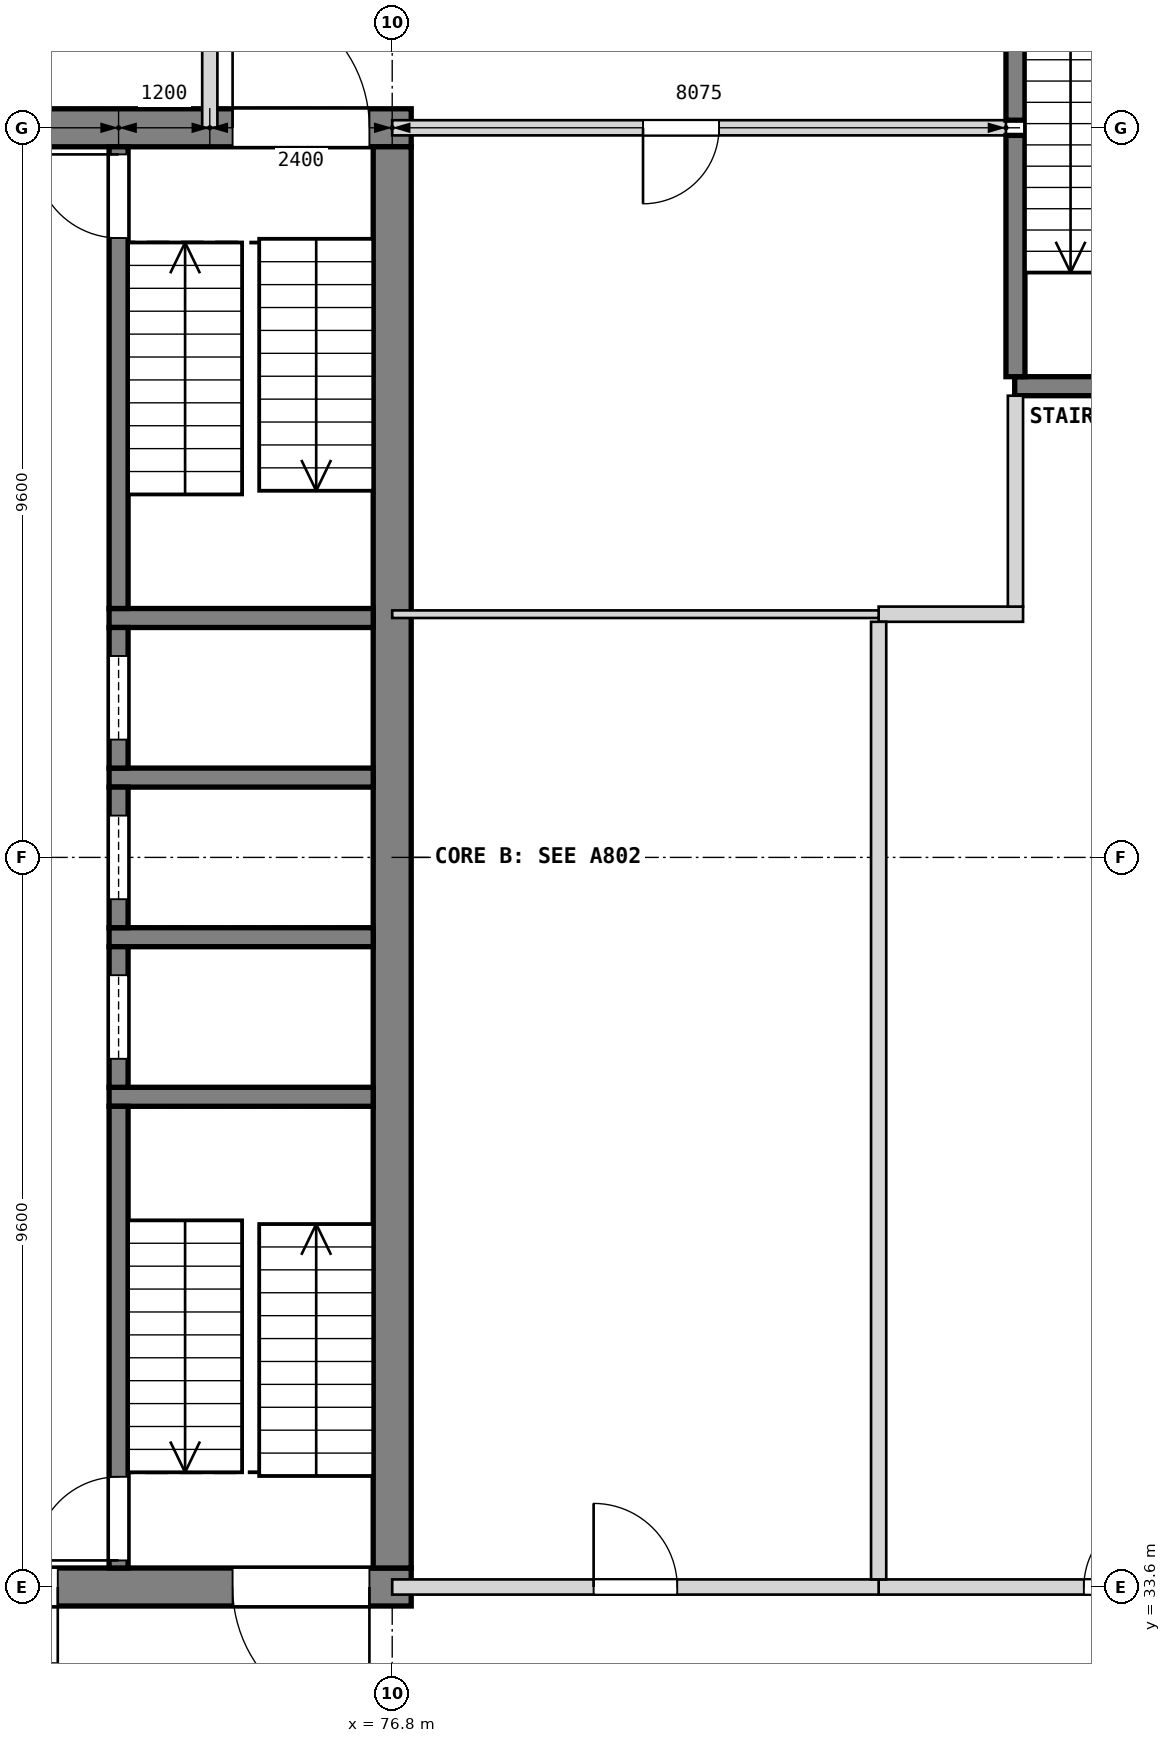
"""IFC4 building model, lengths in metres.
Left out: names, types, materials, properties, quantities, classifications, styles, units other than length and angle.
Written with IfcOpenShell. Run it as: python <this file> out.ifc"""

import sys

from ifc_helpers import new_model, si_unit, direction, frame, frame_2d, origin, place, context, subcontext, project, spatial, rectangle, extrude, element, fill, save


model = new_model("IFC4")
c1 = context("Model", 3, precision=1e-05, world=origin(), true_north=direction((0.0, 1.0)))
c2 = subcontext(c1, "Body", "Model", "MODEL_VIEW")
j1 = project(units=[si_unit("LENGTHUNIT", "METRE"), si_unit("PLANEANGLEUNIT", "RADIAN")], contexts=[c1])
p1 = place(None, origin())
s1 = spatial("IfcSite", under=j1, at=p1, CompositionType="ELEMENT")
p2 = place(p1, origin())
s2 = spatial("IfcBuilding", under=s1, at=p2, CompositionType="ELEMENT")
p3 = place(p2, origin())
s3 = spatial("IfcBuildingStorey", under=s2, at=p3, CompositionType="ELEMENT", Elevation=0.0)
p4 = place(p3, frame((63.75, 52.8, 0.0), z_axis=(0.0, 0.0, 1.0), x_axis=(1.0, 0.0, 0.0)))
e1 = element("IfcWall", 1, at=p4, inside=s3, PredefinedType="SHEAR", context=c2, shape_type="SweptSolid", body=[
    extrude(rectangle(XDim=13.3, YDim=0.5, at=frame_2d((6.65, 0.0))), origin(), (0.0, 0.0, 1.0), 4.2),
])
p5 = place(p4, frame((10.95, 0.0, 0.0)))
e2 = element("IfcOpeningElement", 2, at=p5, cuts=e1, PredefinedType="OPENING", context=c2, shape_type="SweptSolid", body=[
    extrude(rectangle(XDim=1.8, YDim=2.1, at=frame_2d((0.9, 1.05))), frame((0.0, 0.26, 0.0), z_axis=(0.0, -1.0, 0.0), x_axis=(1.0, 0.0, 0.0)), (0.0, 0.0, 1.0), 0.52),
])
p6 = place(p3, frame((63.75, 33.6, 0.0), z_axis=(0.0, 0.0, 1.0), x_axis=(1.0, 0.0, 0.0)))
e3 = element("IfcWall", 3, at=p6, inside=s3, PredefinedType="SHEAR", context=c2, shape_type="SweptSolid", body=[
    extrude(rectangle(XDim=13.3, YDim=0.5, at=frame_2d((6.65, 0.0))), origin(), (0.0, 0.0, 1.0), 4.2),
])
p7 = place(p6, frame((6.65, 0.0, 0.0)))
e4 = element("IfcOpeningElement", 4, at=p7, cuts=e3, PredefinedType="OPENING", context=c2, shape_type="SweptSolid", body=[
    extrude(rectangle(XDim=2.0, YDim=2.1, at=frame_2d((1.0, 1.05))), frame((0.0, 0.26, 0.0), z_axis=(0.0, -1.0, 0.0), x_axis=(1.0, 0.0, 0.0)), (0.0, 0.0, 1.0), 0.52),
])
p8 = place(p6, frame((10.95, 0.0, 0.0)))
e5 = element("IfcOpeningElement", 5, at=p8, cuts=e3, PredefinedType="OPENING", context=c2, shape_type="SweptSolid", body=[
    extrude(rectangle(XDim=1.8, YDim=2.1, at=frame_2d((0.9, 1.05))), frame((0.0, 0.26, 0.0), z_axis=(0.0, -1.0, 0.0), x_axis=(1.0, 0.0, 0.0)), (0.0, 0.0, 1.0), 0.52),
])
p9 = place(p3, frame((76.8, 33.85, 0.0), z_axis=(0.0, 0.0, 1.0), x_axis=(0.0, 1.0, 0.0)))
e6 = element("IfcWall", 6, at=p9, inside=s3, PredefinedType="SHEAR", context=c2, shape_type="SweptSolid", body=[
    extrude(rectangle(XDim=18.7, YDim=0.5, at=frame_2d((9.35, 0.0))), origin(), (0.0, 0.0, 1.0), 4.2),
])
for number, where, z_axis, x_axis in (
    (7, (76.55, 40.05, 0.0), (0.0, 0.0, 1.0), (-1.0, 0.0, 0.0)),
    (8, (76.55, 42.15, 0.0), (0.0, 0.0, 1.0), (-1.0, 0.0, 0.0)),
    (9, (76.55, 44.25, 0.0), (0.0, 0.0, 1.0), (-1.0, 0.0, 0.0)),
    (10, (76.55, 46.35, 0.0), (0.0, 0.0, 1.0), (-1.0, 0.0, 0.0)),
):
    element("IfcWall", number, at=place(p3, frame(where, z_axis=z_axis, x_axis=x_axis)), inside=s3, PredefinedType="SOLIDWALL", context=c2, shape_type="SweptSolid", body=[
        extrude(rectangle(XDim=3.475, YDim=0.25, at=frame_2d((1.738, 0.0))), origin(), (0.0, 0.0, 1.0), 3.9),
    ])
p10 = place(p3, frame((73.2, 33.85, 0.0), z_axis=(0.0, 0.0, 1.0), x_axis=(0.0, 1.0, 0.0)))
e11 = element("IfcWall", 11, at=p10, inside=s3, PredefinedType="SOLIDWALL", context=c2, shape_type="SweptSolid", body=[
    extrude(rectangle(XDim=6.075, YDim=0.25, at=frame_2d((3.038, 0.0))), origin(), (0.0, 0.0, 1.0), 3.9),
])
p11 = place(p10, frame((0.1, 0.0, 0.0)))
e12 = element("IfcOpeningElement", 12, at=p11, cuts=e11, PredefinedType="OPENING", context=c2, shape_type="SweptSolid", body=[
    extrude(rectangle(XDim=1.1, YDim=2.1, at=frame_2d((0.55, 1.05))), frame((0.0, 0.135, 0.0), z_axis=(0.0, -1.0, 0.0), x_axis=(1.0, 0.0, 0.0)), (0.0, 0.0, 1.0), 0.27),
])
p12 = place(p3, frame((73.2, 40.175, 0.0), z_axis=(0.0, 0.0, 1.0), x_axis=(0.0, 1.0, 0.0)))
e13 = element("IfcWall", 13, at=p12, inside=s3, PredefinedType="SOLIDWALL", context=c2, shape_type="SweptSolid", body=[
    extrude(rectangle(XDim=1.85, YDim=0.25, at=frame_2d((0.925, 0.0))), origin(), (0.0, 0.0, 1.0), 3.9),
])
p13 = place(p12, frame((0.375, 0.0, 0.0)))
e14 = element("IfcOpeningElement", 14, at=p13, cuts=e13, PredefinedType="OPENING", context=c2, shape_type="SweptSolid", body=[
    extrude(rectangle(XDim=1.1, YDim=2.1, at=frame_2d((0.55, 1.05))), frame((0.0, 0.135, 0.0), z_axis=(0.0, -1.0, 0.0), x_axis=(1.0, 0.0, 0.0)), (0.0, 0.0, 1.0), 0.27),
])
p14 = place(p3, frame((73.2, 42.275, 0.0), z_axis=(0.0, 0.0, 1.0), x_axis=(0.0, 1.0, 0.0)))
e15 = element("IfcWall", 15, at=p14, inside=s3, PredefinedType="SOLIDWALL", context=c2, shape_type="SweptSolid", body=[
    extrude(rectangle(XDim=1.85, YDim=0.25, at=frame_2d((0.925, 0.0))), origin(), (0.0, 0.0, 1.0), 3.9),
])
p15 = place(p14, frame((0.375, 0.0, 0.0)))
e16 = element("IfcOpeningElement", 16, at=p15, cuts=e15, PredefinedType="OPENING", context=c2, shape_type="SweptSolid", body=[
    extrude(rectangle(XDim=1.1, YDim=2.1, at=frame_2d((0.55, 1.05))), frame((0.0, 0.135, 0.0), z_axis=(0.0, -1.0, 0.0), x_axis=(1.0, 0.0, 0.0)), (0.0, 0.0, 1.0), 0.27),
])
p16 = place(p3, frame((73.2, 44.375, 0.0), z_axis=(0.0, 0.0, 1.0), x_axis=(0.0, 1.0, 0.0)))
e17 = element("IfcWall", 17, at=p16, inside=s3, PredefinedType="SOLIDWALL", context=c2, shape_type="SweptSolid", body=[
    extrude(rectangle(XDim=1.85, YDim=0.25, at=frame_2d((0.925, 0.0))), origin(), (0.0, 0.0, 1.0), 3.9),
])
p17 = place(p16, frame((0.375, 0.0, 0.0)))
e18 = element("IfcOpeningElement", 18, at=p17, cuts=e17, PredefinedType="OPENING", context=c2, shape_type="SweptSolid", body=[
    extrude(rectangle(XDim=1.1, YDim=2.1, at=frame_2d((0.55, 1.05))), frame((0.0, 0.135, 0.0), z_axis=(0.0, -1.0, 0.0), x_axis=(1.0, 0.0, 0.0)), (0.0, 0.0, 1.0), 0.27),
])
p18 = place(p3, frame((73.2, 46.475, 0.0), z_axis=(0.0, 0.0, 1.0), x_axis=(0.0, 1.0, 0.0)))
e19 = element("IfcWall", 19, at=p18, inside=s3, PredefinedType="SOLIDWALL", context=c2, shape_type="SweptSolid", body=[
    extrude(rectangle(XDim=6.075, YDim=0.25, at=frame_2d((3.038, 0.0))), origin(), (0.0, 0.0, 1.0), 3.9),
])
p19 = place(p18, frame((4.875, 0.0, 0.0)))
e20 = element("IfcOpeningElement", 20, at=p19, cuts=e19, PredefinedType="OPENING", context=c2, shape_type="SweptSolid", body=[
    extrude(rectangle(XDim=1.1, YDim=2.1, at=frame_2d((0.55, 1.05))), frame((0.0, 0.135, 0.0), z_axis=(0.0, -1.0, 0.0), x_axis=(1.0, 0.0, 0.0)), (0.0, 0.0, 1.0), 0.27),
])
p20 = place(p3, frame((89.45, 33.6, 0.0), z_axis=(0.0, 0.0, 1.0), x_axis=(-1.0, 0.0, 0.0)))
e21 = element("IfcWall", 21, at=p20, inside=s3, PredefinedType="PARTITIONING", context=c2, shape_type="SweptSolid", body=[
    extrude(rectangle(XDim=6.25, YDim=0.2, at=frame_2d((3.125, 0.0))), origin(), (0.0, 0.0, 1.0), 3.9),
])
p21 = place(p20, frame((2.55, 0.0, 0.0)))
e22 = element("IfcOpeningElement", 22, at=p21, cuts=e21, PredefinedType="OPENING", context=c2, shape_type="SweptSolid", body=[
    extrude(rectangle(XDim=1.0, YDim=2.1, at=frame_2d((0.5, 1.05))), frame((0.0, 0.11, 0.0), z_axis=(0.0, -1.0, 0.0), x_axis=(1.0, 0.0, 0.0)), (0.0, 0.0, 1.0), 0.22),
])
p22 = place(p3, frame((83.2, 33.6, 0.0), z_axis=(0.0, 0.0, 1.0), x_axis=(-1.0, 0.0, 0.0)))
e23 = element("IfcWall", 23, at=p22, inside=s3, PredefinedType="PARTITIONING", context=c2, shape_type="SweptSolid", body=[
    extrude(rectangle(XDim=6.4, YDim=0.2, at=frame_2d((3.2, 0.0))), origin(), (0.0, 0.0, 1.0), 3.9),
])
p23 = place(p22, frame((2.65, 0.0, 0.0)))
e24 = element("IfcOpeningElement", 24, at=p23, cuts=e23, PredefinedType="OPENING", context=c2, shape_type="SweptSolid", body=[
    extrude(rectangle(XDim=1.1, YDim=2.1, at=frame_2d((0.55, 1.05))), frame((0.0, 0.11, 0.0), z_axis=(0.0, -1.0, 0.0), x_axis=(1.0, 0.0, 0.0)), (0.0, 0.0, 1.0), 0.22),
])
p24 = place(p3, frame((85.1, 46.4, 0.0), z_axis=(0.0, 0.0, 1.0), x_axis=(-1.0, 0.0, 0.0)))
e25 = element("IfcWall", 25, at=p24, inside=s3, PredefinedType="PARTITIONING", context=c2, shape_type="SweptSolid", body=[
    extrude(rectangle(XDim=1.9, YDim=0.2, at=frame_2d((0.95, 0.0))), origin(), (0.0, 0.0, 1.0), 3.9),
])
p25 = place(p3, frame((83.2, 46.4, 0.0), z_axis=(0.0, 0.0, 1.0), x_axis=(-1.0, 0.0, 0.0)))
e26 = element("IfcWall", 26, at=p25, inside=s3, PredefinedType="PARTITIONING", context=c2, shape_type="SweptSolid", body=[
    extrude(rectangle(XDim=6.4, YDim=0.1, at=frame_2d((3.2, 0.0))), origin(), (0.0, 0.0, 1.0), 3.9),
])
p26 = place(p3, frame((88.6, 49.4, 0.0), z_axis=(0.0, 0.0, 1.0), x_axis=(-1.0, 0.0, 0.0)))
e27 = element("IfcWall", 27, at=p26, inside=s3, PredefinedType="SHEAR", context=c2, shape_type="SweptSolid", body=[
    extrude(rectangle(XDim=3.61, YDim=0.25, at=frame_2d((1.805, 0.0))), origin(), (0.0, 0.0, 1.0), 3.9),
])
p27 = place(p3, frame((84.875, 52.8, 0.0), z_axis=(0.0, 0.0, 1.0), x_axis=(-1.0, 0.0, 0.0)))
e28 = element("IfcWall", 28, at=p27, inside=s3, PredefinedType="PARTITIONING", context=c2, shape_type="SweptSolid", body=[
    extrude(rectangle(XDim=8.075, YDim=0.2, at=frame_2d((4.038, 0.0))), origin(), (0.0, 0.0, 1.0), 3.9),
])
p28 = place(p27, frame((3.775, 0.0, 0.0)))
e29 = element("IfcOpeningElement", 29, at=p28, cuts=e28, PredefinedType="OPENING", context=c2, shape_type="SweptSolid", body=[
    extrude(rectangle(XDim=1.0, YDim=2.1, at=frame_2d((0.5, 1.05))), frame((0.0, 0.11, 0.0), z_axis=(0.0, -1.0, 0.0), x_axis=(1.0, 0.0, 0.0)), (0.0, 0.0, 1.0), 0.22),
])
p29 = place(p3, frame((85.0, 46.5, 0.0), z_axis=(0.0, 0.0, 1.0), x_axis=(0.0, 1.0, 0.0)))
e30 = element("IfcWall", 30, at=p29, inside=s3, PredefinedType="PARTITIONING", context=c2, shape_type="SweptSolid", body=[
    extrude(rectangle(XDim=2.775, YDim=0.2, at=frame_2d((1.387, 0.0))), origin(), (0.0, 0.0, 1.0), 3.9),
])
p30 = place(p3, frame((85.0, 49.525, 0.0), z_axis=(0.0, 0.0, 1.0), x_axis=(0.0, 1.0, 0.0)))
e31 = element("IfcWall", 31, at=p30, inside=s3, PredefinedType="SHEAR", context=c2, shape_type="SweptSolid", body=[
    extrude(rectangle(XDim=3.175, YDim=0.25, at=frame_2d((1.587, 0.0))), origin(), (0.0, 0.0, 1.0), 3.9),
])
p31 = place(p3, frame((85.0, 52.9, 0.0), z_axis=(0.0, 0.0, 1.0), x_axis=(0.0, 1.0, 0.0)))
e32 = element("IfcWall", 32, at=p31, inside=s3, PredefinedType="SHEAR", context=c2, shape_type="SweptSolid", body=[
    extrude(rectangle(XDim=2.375, YDim=0.25, at=frame_2d((1.188, 0.0))), origin(), (0.0, 0.0, 1.0), 3.9),
])
p32 = place(p31, frame((1.075, 0.0, 0.0)))
e33 = element("IfcOpeningElement", 33, at=p32, cuts=e32, PredefinedType="OPENING", context=c2, shape_type="SweptSolid", body=[
    extrude(rectangle(XDim=1.2, YDim=2.1, at=frame_2d((0.6, 1.05))), frame((0.0, 0.135, 0.0), z_axis=(0.0, -1.0, 0.0), x_axis=(1.0, 0.0, 0.0)), (0.0, 0.0, 1.0), 0.27),
])
p33 = place(p3, frame((83.2, 33.7, 0.0), z_axis=(0.0, 0.0, 1.0), x_axis=(0.0, 1.0, 0.0)))
e34 = element("IfcWall", 34, at=p33, inside=s3, PredefinedType="PARTITIONING", context=c2, shape_type="SweptSolid", body=[
    extrude(rectangle(XDim=12.6, YDim=0.2, at=frame_2d((6.3, 0.0))), origin(), (0.0, 0.0, 1.0), 3.0),
])
p34 = place(p3, frame((74.4, 52.8, 0.0), z_axis=(0.0, 0.0, 1.0), x_axis=(0.0, 1.0, 0.0)))
e35 = element("IfcWall", 35, at=p34, inside=s3, PredefinedType="PARTITIONING", context=c2, shape_type="SweptSolid", body=[
    extrude(rectangle(XDim=4.65, YDim=0.2, at=frame_2d((2.325, 0.0))), origin(), (0.0, 0.0, 1.0), 3.9),
])
p35 = place(p34, frame((1.85, 0.0, 0.0)))
e36 = element("IfcOpeningElement", 36, at=p35, cuts=e35, PredefinedType="OPENING", context=c2, shape_type="SweptSolid", body=[
    extrude(rectangle(XDim=1.1, YDim=2.1, at=frame_2d((0.55, 1.05))), frame((0.0, 0.11, 0.0), z_axis=(0.0, -1.0, 0.0), x_axis=(1.0, 0.0, 0.0)), (0.0, 0.0, 1.0), 0.22),
])
p36 = place(p11, origin())
e37 = element("IfcDoor", 37, at=p36, inside=s3, OperationType="SINGLE_SWING_LEFT", PredefinedType="DOOR", context=c2, shape_type="SweptSolid", body=[
    extrude(rectangle(XDim=1.1, YDim=2.1, at=frame_2d((0.55, 1.05))), frame((0.0, 0.025, 0.0), z_axis=(0.0, -1.0, 0.0), x_axis=(1.0, 0.0, 0.0)), (0.0, 0.0, 1.0), 0.05),
])
fill(e12, e37)
p37 = place(p19, origin())
e38 = element("IfcDoor", 38, at=p37, inside=s3, OperationType="SINGLE_SWING_RIGHT", PredefinedType="DOOR", context=c2, shape_type="SweptSolid", body=[
    extrude(rectangle(XDim=1.1, YDim=2.1, at=frame_2d((0.55, 1.05))), frame((0.0, 0.025, 0.0), z_axis=(0.0, -1.0, 0.0), x_axis=(1.0, 0.0, 0.0)), (0.0, 0.0, 1.0), 0.05),
])
fill(e20, e38)
p38 = place(p13, origin())
e39 = element("IfcDoor", 39, at=p38, inside=s3, OperationType="SLIDING_TO_LEFT", PredefinedType="DOOR", context=c2, shape_type="SweptSolid", body=[
    extrude(rectangle(XDim=1.1, YDim=2.1, at=frame_2d((0.55, 1.05))), frame((0.0, 0.025, 0.0), z_axis=(0.0, -1.0, 0.0), x_axis=(1.0, 0.0, 0.0)), (0.0, 0.0, 1.0), 0.05),
])
fill(e14, e39)
p39 = place(p15, origin())
e40 = element("IfcDoor", 40, at=p39, inside=s3, OperationType="SLIDING_TO_LEFT", PredefinedType="DOOR", context=c2, shape_type="SweptSolid", body=[
    extrude(rectangle(XDim=1.1, YDim=2.1, at=frame_2d((0.55, 1.05))), frame((0.0, 0.025, 0.0), z_axis=(0.0, -1.0, 0.0), x_axis=(1.0, 0.0, 0.0)), (0.0, 0.0, 1.0), 0.05),
])
fill(e16, e40)
p40 = place(p17, origin())
e41 = element("IfcDoor", 41, at=p40, inside=s3, OperationType="SLIDING_TO_LEFT", PredefinedType="DOOR", context=c2, shape_type="SweptSolid", body=[
    extrude(rectangle(XDim=1.1, YDim=2.1, at=frame_2d((0.55, 1.05))), frame((0.0, 0.025, 0.0), z_axis=(0.0, -1.0, 0.0), x_axis=(1.0, 0.0, 0.0)), (0.0, 0.0, 1.0), 0.05),
])
fill(e18, e41)
p41 = place(p7, frame((2.0, 0.0, 0.0), z_axis=(0.0, 0.0, 1.0), x_axis=(-1.0, 0.0, 0.0)))
e42 = element("IfcDoor", 42, at=p41, inside=s3, OperationType="DOUBLE_DOOR_SINGLE_SWING", PredefinedType="DOOR", context=c2, shape_type="SweptSolid", body=[
    extrude(rectangle(XDim=2.0, YDim=2.1, at=frame_2d((1.0, 1.05))), frame((0.0, 0.025, 0.0), z_axis=(0.0, -1.0, 0.0), x_axis=(1.0, 0.0, 0.0)), (0.0, 0.0, 1.0), 0.05),
])
fill(e4, e42)
p42 = place(p8, frame((1.8, 0.0, 0.0), z_axis=(0.0, 0.0, 1.0), x_axis=(-1.0, 0.0, 0.0)))
e43 = element("IfcDoor", 43, at=p42, inside=s3, OperationType="SINGLE_SWING_LEFT", PredefinedType="DOOR", context=c2, shape_type="SweptSolid", body=[
    extrude(rectangle(XDim=1.8, YDim=2.1, at=frame_2d((0.9, 1.05))), frame((0.0, 0.025, 0.0), z_axis=(0.0, -1.0, 0.0), x_axis=(1.0, 0.0, 0.0)), (0.0, 0.0, 1.0), 0.05),
])
fill(e5, e43)
p43 = place(p5, origin())
e44 = element("IfcDoor", 44, at=p43, inside=s3, OperationType="SINGLE_SWING_LEFT", PredefinedType="DOOR", context=c2, shape_type="SweptSolid", body=[
    extrude(rectangle(XDim=1.8, YDim=2.1, at=frame_2d((0.9, 1.05))), frame((0.0, 0.025, 0.0), z_axis=(0.0, -1.0, 0.0), x_axis=(1.0, 0.0, 0.0)), (0.0, 0.0, 1.0), 0.05),
])
fill(e2, e44)
p44 = place(p21, frame((1.0, 0.0, 0.0), z_axis=(0.0, 0.0, 1.0), x_axis=(-1.0, 0.0, 0.0)))
e45 = element("IfcDoor", 45, at=p44, inside=s3, OperationType="SINGLE_SWING_RIGHT", PredefinedType="DOOR", context=c2, shape_type="SweptSolid", body=[
    extrude(rectangle(XDim=1.0, YDim=2.1, at=frame_2d((0.5, 1.05))), frame((0.0, 0.025, 0.0), z_axis=(0.0, -1.0, 0.0), x_axis=(1.0, 0.0, 0.0)), (0.0, 0.0, 1.0), 0.05),
])
fill(e22, e45)
p45 = place(p23, frame((1.1, 0.0, 0.0), z_axis=(0.0, 0.0, 1.0), x_axis=(-1.0, 0.0, 0.0)))
e46 = element("IfcDoor", 46, at=p45, inside=s3, OperationType="SINGLE_SWING_LEFT", PredefinedType="DOOR", context=c2, shape_type="SweptSolid", body=[
    extrude(rectangle(XDim=1.1, YDim=2.1, at=frame_2d((0.55, 1.05))), frame((0.0, 0.025, 0.0), z_axis=(0.0, -1.0, 0.0), x_axis=(1.0, 0.0, 0.0)), (0.0, 0.0, 1.0), 0.05),
])
fill(e24, e46)
p46 = place(p28, origin())
e47 = element("IfcDoor", 47, at=p46, inside=s3, OperationType="SINGLE_SWING_RIGHT", PredefinedType="DOOR", context=c2, shape_type="SweptSolid", body=[
    extrude(rectangle(XDim=1.0, YDim=2.1, at=frame_2d((0.5, 1.05))), frame((0.0, 0.025, 0.0), z_axis=(0.0, -1.0, 0.0), x_axis=(1.0, 0.0, 0.0)), (0.0, 0.0, 1.0), 0.05),
])
fill(e29, e47)
save(model, sys.argv[1])
